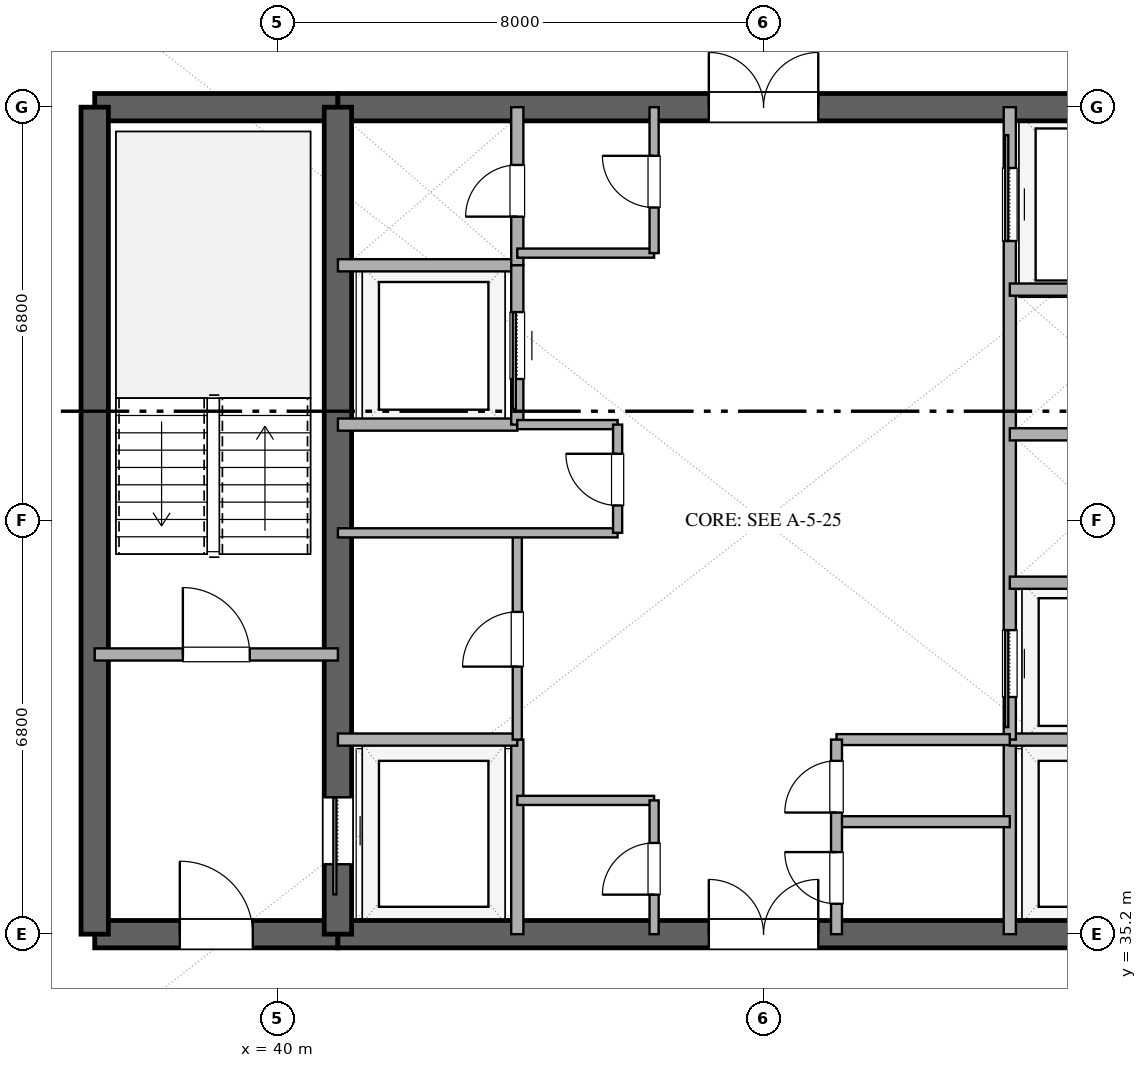
"""IFC4 building model, lengths in metres.
Left out: names, types, materials, properties, quantities, classifications, styles, units other than length and angle.
Written with IfcOpenShell. Run it as: python <this file> out.ifc"""

import sys

from ifc_helpers import new_model, si_unit, direction, frame, frame_2d, origin, place, context, subcontext, project, spatial, rectangle, extrude, element, fill, save


model = new_model("IFC4")
c1 = context("Model", 3, precision=1e-05, world=origin(), true_north=direction((0.0, 1.0)))
c2 = subcontext(c1, "Body", "Model", "MODEL_VIEW")
j1 = project(units=[si_unit("LENGTHUNIT", "METRE"), si_unit("PLANEANGLEUNIT", "RADIAN")], contexts=[c1])
p1 = place(None, origin())
s1 = spatial("IfcSite", under=j1, at=p1, CompositionType="ELEMENT")
p2 = place(p1, origin())
s2 = spatial("IfcBuilding", under=s1, at=p2, CompositionType="ELEMENT")
p3 = place(p2, frame((0.0, 0.0, 150.6)))
s3 = spatial("IfcBuildingStorey", under=s2, at=p3, CompositionType="ELEMENT", Elevation=150.6)
p4 = place(p3, frame((37.0, 35.2, 0.0), z_axis=(0.0, 0.0, 1.0), x_axis=(1.0, 0.0, 0.0)))
e1 = element("IfcWall", 1, at=p4, inside=s3, PredefinedType="SHEAR", context=c2, shape_type="SweptSolid", body=[
    extrude(rectangle(XDim=4.0, YDim=0.45, at=frame_2d((2.0, 0.0))), origin(), (0.0, 0.0, 1.0), 3.38),
])
p5 = place(p4, frame((1.4, 0.0, 0.0)))
e2 = element("IfcOpeningElement", 2, at=p5, cuts=e1, PredefinedType="OPENING", context=c2, shape_type="SweptSolid", body=[
    extrude(rectangle(XDim=1.2, YDim=2.15, at=frame_2d((0.6, 1.075))), frame((0.0, 0.235, 0.0), z_axis=(0.0, -1.0, 0.0), x_axis=(1.0, 0.0, 0.0)), (0.0, 0.0, 1.0), 0.47),
])
p6 = place(p3, frame((41.0, 35.2, 0.0), z_axis=(0.0, 0.0, 1.0), x_axis=(1.0, 0.0, 0.0)))
e3 = element("IfcWall", 3, at=p6, inside=s3, PredefinedType="SHEAR", context=c2, shape_type="SweptSolid", body=[
    extrude(rectangle(XDim=14.0, YDim=0.45, at=frame_2d((7.0, 0.0))), origin(), (0.0, 0.0, 1.0), 3.38),
])
p7 = place(p6, frame((6.1, 0.0, 0.0)))
e4 = element("IfcOpeningElement", 4, at=p7, cuts=e3, PredefinedType="OPENING", context=c2, shape_type="SweptSolid", body=[
    extrude(rectangle(XDim=1.8, YDim=2.25, at=frame_2d((0.9, 1.125))), frame((0.0, 0.235, 0.0), z_axis=(0.0, -1.0, 0.0), x_axis=(1.0, 0.0, 0.0)), (0.0, 0.0, 1.0), 0.47),
])
p8 = place(p3, frame((37.0, 48.8, 0.0), z_axis=(0.0, 0.0, 1.0), x_axis=(1.0, 0.0, 0.0)))
e5 = element("IfcWall", 5, at=p8, inside=s3, PredefinedType="SHEAR", context=c2, shape_type="SweptSolid", body=[
    extrude(rectangle(XDim=4.0, YDim=0.45, at=frame_2d((2.0, 0.0))), origin(), (0.0, 0.0, 1.0), 3.38),
])
p9 = place(p3, frame((41.0, 48.8, 0.0), z_axis=(0.0, 0.0, 1.0), x_axis=(1.0, 0.0, 0.0)))
e6 = element("IfcWall", 6, at=p9, inside=s3, PredefinedType="SHEAR", context=c2, shape_type="SweptSolid", body=[
    extrude(rectangle(XDim=14.0, YDim=0.45, at=frame_2d((7.0, 0.0))), origin(), (0.0, 0.0, 1.0), 3.38),
])
p10 = place(p9, frame((6.1, 0.0, 0.0)))
e7 = element("IfcOpeningElement", 7, at=p10, cuts=e6, PredefinedType="OPENING", context=c2, shape_type="SweptSolid", body=[
    extrude(rectangle(XDim=1.8, YDim=2.25, at=frame_2d((0.9, 1.125))), frame((0.0, 0.235, 0.0), z_axis=(0.0, -1.0, 0.0), x_axis=(1.0, 0.0, 0.0)), (0.0, 0.0, 1.0), 0.47),
])
p11 = place(p3, frame((37.0, 35.2, 0.0), z_axis=(0.0, 0.0, 1.0), x_axis=(0.0, 1.0, 0.0)))
e8 = element("IfcWall", 8, at=p11, inside=s3, PredefinedType="SHEAR", context=c2, shape_type="SweptSolid", body=[
    extrude(rectangle(XDim=13.6, YDim=0.45, at=frame_2d((6.8, 0.0))), origin(), (0.0, 0.0, 1.0), 3.38),
])
p12 = place(p3, frame((41.0, 35.2, 0.0), z_axis=(0.0, 0.0, 1.0), x_axis=(0.0, 1.0, 0.0)))
e9 = element("IfcWall", 9, at=p12, inside=s3, PredefinedType="SHEAR", context=c2, shape_type="SweptSolid", body=[
    extrude(rectangle(XDim=13.6, YDim=0.45, at=frame_2d((6.8, 0.0))), origin(), (0.0, 0.0, 1.0), 3.38),
])
p13 = place(p12, frame((1.15, 0.0, 0.0)))
e10 = element("IfcOpeningElement", 10, at=p13, cuts=e9, PredefinedType="OPENING", context=c2, shape_type="SweptSolid", body=[
    extrude(rectangle(XDim=1.1, YDim=2.2, at=frame_2d((0.55, 1.1))), frame((0.0, 0.235, 0.0), z_axis=(0.0, -1.0, 0.0), x_axis=(1.0, 0.0, 0.0)), (0.0, 0.0, 1.0), 0.47),
])
p14 = place(p3, frame((37.0, 39.8, 0.0), z_axis=(0.0, 0.0, 1.0), x_axis=(1.0, 0.0, 0.0)))
e11 = element("IfcWall", 11, at=p14, inside=s3, PredefinedType="SOLIDWALL", context=c2, shape_type="SweptSolid", body=[
    extrude(rectangle(XDim=4.0, YDim=0.2, at=frame_2d((2.0, 0.0))), origin(), (0.0, 0.0, 1.0), 2.74),
])
p15 = place(p14, frame((1.45, 0.0, 0.0)))
e12 = element("IfcOpeningElement", 12, at=p15, cuts=e11, PredefinedType="OPENING", context=c2, shape_type="SweptSolid", body=[
    extrude(rectangle(XDim=1.1, YDim=2.15, at=frame_2d((0.55, 1.075))), frame((0.0, 0.11, 0.0), z_axis=(0.0, -1.0, 0.0), x_axis=(1.0, 0.0, 0.0)), (0.0, 0.0, 1.0), 0.22),
])
p16 = place(p3, frame((43.95, 35.2, 0.0), z_axis=(0.0, 0.0, 1.0), x_axis=(0.0, 1.0, 0.0)))
e13 = element("IfcWall", 13, at=p16, inside=s3, PredefinedType="SOLIDWALL", context=c2, shape_type="SweptSolid", body=[
    extrude(rectangle(XDim=3.2, YDim=0.2, at=frame_2d((1.6, 0.0))), origin(), (0.0, 0.0, 1.0), 2.74),
])
p17 = place(p3, frame((41.0, 38.4, 0.0), z_axis=(0.0, 0.0, 1.0), x_axis=(1.0, 0.0, 0.0)))
e14 = element("IfcWall", 14, at=p17, inside=s3, PredefinedType="SOLIDWALL", context=c2, shape_type="SweptSolid", body=[
    extrude(rectangle(XDim=2.95, YDim=0.2, at=frame_2d((1.475, 0.0))), origin(), (0.0, 0.0, 1.0), 2.74),
])
p18 = place(p3, frame((52.05, 35.2, 0.0), z_axis=(0.0, 0.0, 1.0), x_axis=(0.0, 1.0, 0.0)))
e15 = element("IfcWall", 15, at=p18, inside=s3, PredefinedType="SOLIDWALL", context=c2, shape_type="SweptSolid", body=[
    extrude(rectangle(XDim=3.2, YDim=0.2, at=frame_2d((1.6, 0.0))), origin(), (0.0, 0.0, 1.0), 2.74),
])
for number, where, z_axis, x_axis in (
    (16, (52.05, 38.4, 0.0), (0.0, 0.0, 1.0), (1.0, 0.0, 0.0)),
    (17, (41.0, 46.2, 0.0), (0.0, 0.0, 1.0), (1.0, 0.0, 0.0)),
):
    element("IfcWall", number, at=place(p3, frame(where, z_axis=z_axis, x_axis=x_axis)), inside=s3, PredefinedType="SOLIDWALL", context=c2, shape_type="SweptSolid", body=[
        extrude(rectangle(XDim=2.95, YDim=0.2, at=frame_2d((1.475, 0.0))), origin(), (0.0, 0.0, 1.0), 2.74),
    ])
p19 = place(p3, frame((43.95, 46.2, 0.0), z_axis=(0.0, 0.0, 1.0), x_axis=(0.0, 1.0, 0.0)))
e18 = element("IfcWall", 18, at=p19, inside=s3, PredefinedType="SOLIDWALL", context=c2, shape_type="SweptSolid", body=[
    extrude(rectangle(XDim=2.6, YDim=0.2, at=frame_2d((1.3, 0.0))), origin(), (0.0, 0.0, 1.0), 2.74),
])
p20 = place(p19, frame((0.8, 0.0, 0.0)))
e19 = element("IfcOpeningElement", 19, at=p20, cuts=e18, PredefinedType="OPENING", context=c2, shape_type="SweptSolid", body=[
    extrude(rectangle(XDim=0.85, YDim=2.15, at=frame_2d((0.425, 1.075))), frame((0.0, 0.11, 0.0), z_axis=(0.0, -1.0, 0.0), x_axis=(1.0, 0.0, 0.0)), (0.0, 0.0, 1.0), 0.22),
])
p21 = place(p3, frame((41.0, 43.58, 0.0), z_axis=(0.0, 0.0, 1.0), x_axis=(1.0, 0.0, 0.0)))
e20 = element("IfcWall", 20, at=p21, inside=s3, PredefinedType="SOLIDWALL", context=c2, shape_type="SweptSolid", body=[
    extrude(rectangle(XDim=2.95, YDim=0.2, at=frame_2d((1.475, 0.0))), origin(), (0.0, 0.0, 1.0), 2.74),
])
p22 = place(p3, frame((43.95, 43.58, 0.0), z_axis=(0.0, 0.0, 1.0), x_axis=(0.0, 1.0, 0.0)))
e21 = element("IfcWall", 21, at=p22, inside=s3, PredefinedType="SOLIDWALL", context=c2, shape_type="SweptSolid", body=[
    extrude(rectangle(XDim=2.62, YDim=0.2, at=frame_2d((1.31, 0.0))), origin(), (0.0, 0.0, 1.0), 2.74),
])
p23 = place(p22, frame((0.75, 0.0, 0.0)))
e22 = element("IfcOpeningElement", 22, at=p23, cuts=e21, PredefinedType="OPENING", context=c2, shape_type="SweptSolid", body=[
    extrude(rectangle(XDim=1.1, YDim=2.2, at=frame_2d((0.55, 1.1))), frame((0.0, 0.11, 0.0), z_axis=(0.0, -1.0, 0.0), x_axis=(1.0, 0.0, 0.0)), (0.0, 0.0, 1.0), 0.22),
])
p24 = place(p3, frame((43.95, 38.4, 0.0), z_axis=(0.0, 0.0, 1.0), x_axis=(0.0, 1.0, 0.0)))
e23 = element("IfcWall", 23, at=p24, inside=s3, PredefinedType="PARTITIONING", context=c2, shape_type="SweptSolid", body=[
    extrude(rectangle(XDim=3.4, YDim=0.15, at=frame_2d((1.7, 0.0))), origin(), (0.0, 0.0, 1.0), 2.74),
])
p25 = place(p24, frame((1.2, 0.0, 0.0)))
e24 = element("IfcOpeningElement", 24, at=p25, cuts=e23, PredefinedType="OPENING", context=c2, shape_type="SweptSolid", body=[
    extrude(rectangle(XDim=0.9, YDim=2.15, at=frame_2d((0.45, 1.075))), frame((0.0, 0.085, 0.0), z_axis=(0.0, -1.0, 0.0), x_axis=(1.0, 0.0, 0.0)), (0.0, 0.0, 1.0), 0.17),
])
p26 = place(p3, frame((41.0, 41.8, 0.0), z_axis=(0.0, 0.0, 1.0), x_axis=(1.0, 0.0, 0.0)))
e25 = element("IfcWall", 25, at=p26, inside=s3, PredefinedType="PARTITIONING", context=c2, shape_type="SweptSolid", body=[
    extrude(rectangle(XDim=4.6, YDim=0.15, at=frame_2d((2.3, 0.0))), origin(), (0.0, 0.0, 1.0), 2.74),
])
p27 = place(p3, frame((43.95, 43.58, 0.0), z_axis=(0.0, 0.0, 1.0), x_axis=(1.0, 0.0, 0.0)))
e26 = element("IfcWall", 26, at=p27, inside=s3, PredefinedType="PARTITIONING", context=c2, shape_type="SweptSolid", body=[
    extrude(rectangle(XDim=1.65, YDim=0.15, at=frame_2d((0.825, 0.0))), origin(), (0.0, 0.0, 1.0), 2.74),
])
p28 = place(p3, frame((45.6, 41.8, 0.0), z_axis=(0.0, 0.0, 1.0), x_axis=(0.0, 1.0, 0.0)))
e27 = element("IfcWall", 27, at=p28, inside=s3, PredefinedType="PARTITIONING", context=c2, shape_type="SweptSolid", body=[
    extrude(rectangle(XDim=1.78, YDim=0.15, at=frame_2d((0.89, 0.0))), origin(), (0.0, 0.0, 1.0), 2.74),
])
p29 = place(p28, frame((0.45, 0.0, 0.0)))
e28 = element("IfcOpeningElement", 28, at=p29, cuts=e27, PredefinedType="OPENING", context=c2, shape_type="SweptSolid", body=[
    extrude(rectangle(XDim=0.85, YDim=2.15, at=frame_2d((0.425, 1.075))), frame((0.0, 0.085, 0.0), z_axis=(0.0, -1.0, 0.0), x_axis=(1.0, 0.0, 0.0)), (0.0, 0.0, 1.0), 0.17),
])
p30 = place(p3, frame((52.05, 38.4, 0.0), z_axis=(0.0, 0.0, 1.0), x_axis=(0.0, 1.0, 0.0)))
e29 = element("IfcWall", 29, at=p30, inside=s3, PredefinedType="SOLIDWALL", context=c2, shape_type="SweptSolid", body=[
    extrude(rectangle(XDim=10.4, YDim=0.2, at=frame_2d((5.2, 0.0))), origin(), (0.0, 0.0, 1.0), 2.74),
])
p31 = place(p30, frame((0.7, 0.0, 0.0)))
e30 = element("IfcOpeningElement", 30, at=p31, cuts=e29, PredefinedType="OPENING", context=c2, shape_type="SweptSolid", body=[
    extrude(rectangle(XDim=1.1, YDim=2.2, at=frame_2d((0.55, 1.1))), frame((0.0, 0.11, 0.0), z_axis=(0.0, -1.0, 0.0), x_axis=(1.0, 0.0, 0.0)), (0.0, 0.0, 1.0), 0.22),
])
p32 = place(p30, frame((8.2, 0.0, 0.0)))
e31 = element("IfcOpeningElement", 31, at=p32, cuts=e29, PredefinedType="OPENING", context=c2, shape_type="SweptSolid", body=[
    extrude(rectangle(XDim=1.2, YDim=2.2, at=frame_2d((0.6, 1.1))), frame((0.0, 0.11, 0.0), z_axis=(0.0, -1.0, 0.0), x_axis=(1.0, 0.0, 0.0)), (0.0, 0.0, 1.0), 0.22),
])
for number, where, z_axis, x_axis in (
    (32, (52.05, 40.98, 0.0), (0.0, 0.0, 1.0), (1.0, 0.0, 0.0)),
    (33, (52.05, 43.42, 0.0), (0.0, 0.0, 1.0), (1.0, 0.0, 0.0)),
    (34, (52.05, 45.8, 0.0), (0.0, 0.0, 1.0), (1.0, 0.0, 0.0)),
):
    element("IfcWall", number, at=place(p3, frame(where, z_axis=z_axis, x_axis=x_axis)), inside=s3, PredefinedType="SOLIDWALL", context=c2, shape_type="SweptSolid", body=[
        extrude(rectangle(XDim=2.95, YDim=0.2, at=frame_2d((1.475, 0.0))), origin(), (0.0, 0.0, 1.0), 2.74),
    ])
p33 = place(p3, frame((43.95, 37.4, 0.0), z_axis=(0.0, 0.0, 1.0), x_axis=(1.0, 0.0, 0.0)))
e35 = element("IfcWall", 35, at=p33, inside=s3, PredefinedType="PARTITIONING", context=c2, shape_type="SweptSolid", body=[
    extrude(rectangle(XDim=2.25, YDim=0.15, at=frame_2d((1.125, 0.0))), origin(), (0.0, 0.0, 1.0), 2.74),
])
p34 = place(p3, frame((46.2, 35.2, 0.0), z_axis=(0.0, 0.0, 1.0), x_axis=(0.0, 1.0, 0.0)))
e36 = element("IfcWall", 36, at=p34, inside=s3, PredefinedType="PARTITIONING", context=c2, shape_type="SweptSolid", body=[
    extrude(rectangle(XDim=2.2, YDim=0.15, at=frame_2d((1.1, 0.0))), origin(), (0.0, 0.0, 1.0), 2.74),
])
p35 = place(p34, frame((0.65, 0.0, 0.0)))
e37 = element("IfcOpeningElement", 37, at=p35, cuts=e36, PredefinedType="OPENING", context=c2, shape_type="SweptSolid", body=[
    extrude(rectangle(XDim=0.85, YDim=2.15, at=frame_2d((0.425, 1.075))), frame((0.0, 0.085, 0.0), z_axis=(0.0, -1.0, 0.0), x_axis=(1.0, 0.0, 0.0)), (0.0, 0.0, 1.0), 0.17),
])
p36 = place(p3, frame((43.95, 46.4, 0.0), z_axis=(0.0, 0.0, 1.0), x_axis=(1.0, 0.0, 0.0)))
e38 = element("IfcWall", 38, at=p36, inside=s3, PredefinedType="PARTITIONING", context=c2, shape_type="SweptSolid", body=[
    extrude(rectangle(XDim=2.25, YDim=0.15, at=frame_2d((1.125, 0.0))), origin(), (0.0, 0.0, 1.0), 2.74),
])
p37 = place(p3, frame((46.2, 46.4, 0.0), z_axis=(0.0, 0.0, 1.0), x_axis=(0.0, 1.0, 0.0)))
e39 = element("IfcWall", 39, at=p37, inside=s3, PredefinedType="PARTITIONING", context=c2, shape_type="SweptSolid", body=[
    extrude(rectangle(XDim=2.4, YDim=0.15, at=frame_2d((1.2, 0.0))), origin(), (0.0, 0.0, 1.0), 2.74),
])
p38 = place(p37, frame((0.75, 0.0, 0.0)))
e40 = element("IfcOpeningElement", 40, at=p38, cuts=e39, PredefinedType="OPENING", context=c2, shape_type="SweptSolid", body=[
    extrude(rectangle(XDim=0.85, YDim=2.15, at=frame_2d((0.425, 1.075))), frame((0.0, 0.085, 0.0), z_axis=(0.0, -1.0, 0.0), x_axis=(1.0, 0.0, 0.0)), (0.0, 0.0, 1.0), 0.17),
])
for number, where, z_axis, x_axis in (
    (41, (49.2, 37.05, 0.0), (0.0, 0.0, 1.0), (1.0, 0.0, 0.0)),
    (42, (49.2, 38.4, 0.0), (0.0, 0.0, 1.0), (1.0, 0.0, 0.0)),
):
    element("IfcWall", number, at=place(p3, frame(where, z_axis=z_axis, x_axis=x_axis)), inside=s3, PredefinedType="PLUMBINGWALL", context=c2, shape_type="SweptSolid", body=[
        extrude(rectangle(XDim=2.85, YDim=0.18, at=frame_2d((1.425, 0.0))), origin(), (0.0, 0.0, 1.0), 2.74),
    ])
p39 = place(p3, frame((49.2, 35.2, 0.0), z_axis=(0.0, 0.0, 1.0), x_axis=(0.0, 1.0, 0.0)))
e43 = element("IfcWall", 43, at=p39, inside=s3, PredefinedType="PLUMBINGWALL", context=c2, shape_type="SweptSolid", body=[
    extrude(rectangle(XDim=3.2, YDim=0.18, at=frame_2d((1.6, 0.0))), origin(), (0.0, 0.0, 1.0), 2.74),
])
p40 = place(p39, frame((0.5, 0.0, 0.0)))
e44 = element("IfcOpeningElement", 44, at=p40, cuts=e43, PredefinedType="OPENING", context=c2, shape_type="SweptSolid", body=[
    extrude(rectangle(XDim=0.85, YDim=2.1, at=frame_2d((0.425, 1.05))), frame((0.0, 0.1, 0.0), z_axis=(0.0, -1.0, 0.0), x_axis=(1.0, 0.0, 0.0)), (0.0, 0.0, 1.0), 0.2),
])
p41 = place(p39, frame((2.0, 0.0, 0.0)))
e45 = element("IfcOpeningElement", 45, at=p41, cuts=e43, PredefinedType="OPENING", context=c2, shape_type="SweptSolid", body=[
    extrude(rectangle(XDim=0.85, YDim=2.15, at=frame_2d((0.425, 1.075))), frame((0.0, 0.1, 0.0), z_axis=(0.0, -1.0, 0.0), x_axis=(1.0, 0.0, 0.0)), (0.0, 0.0, 1.0), 0.2),
])
p42 = place(p13, origin())
e46 = element("IfcDoor", 46, at=p42, inside=s3, OperationType="SLIDING_TO_LEFT", PredefinedType="DOOR", context=c2, shape_type="SweptSolid", body=[
    extrude(rectangle(XDim=1.1, YDim=2.2, at=frame_2d((0.55, 1.1))), frame((0.0, 0.025, 0.0), z_axis=(0.0, -1.0, 0.0), x_axis=(1.0, 0.0, 0.0)), (0.0, 0.0, 1.0), 0.05),
])
fill(e10, e46)
p43 = place(p5, origin())
e47 = element("IfcDoor", 47, at=p43, inside=s3, OperationType="SINGLE_SWING_LEFT", PredefinedType="DOOR", context=c2, shape_type="SweptSolid", body=[
    extrude(rectangle(XDim=1.2, YDim=2.15, at=frame_2d((0.6, 1.075))), frame((0.0, 0.025, 0.0), z_axis=(0.0, -1.0, 0.0), x_axis=(1.0, 0.0, 0.0)), (0.0, 0.0, 1.0), 0.05),
])
fill(e2, e47)
p44 = place(p7, origin())
e48 = element("IfcDoor", 48, at=p44, inside=s3, OperationType="DOUBLE_DOOR_SINGLE_SWING", PredefinedType="DOOR", context=c2, shape_type="SweptSolid", body=[
    extrude(rectangle(XDim=1.8, YDim=2.25, at=frame_2d((0.9, 1.125))), frame((0.0, 0.025, 0.0), z_axis=(0.0, -1.0, 0.0), x_axis=(1.0, 0.0, 0.0)), (0.0, 0.0, 1.0), 0.05),
])
fill(e4, e48)
p45 = place(p10, origin())
e49 = element("IfcDoor", 49, at=p45, inside=s3, OperationType="DOUBLE_DOOR_SINGLE_SWING", PredefinedType="DOOR", context=c2, shape_type="SweptSolid", body=[
    extrude(rectangle(XDim=1.8, YDim=2.25, at=frame_2d((0.9, 1.125))), frame((0.0, 0.025, 0.0), z_axis=(0.0, -1.0, 0.0), x_axis=(1.0, 0.0, 0.0)), (0.0, 0.0, 1.0), 0.05),
])
fill(e7, e49)
p46 = place(p15, origin())
e50 = element("IfcDoor", 50, at=p46, inside=s3, OperationType="SINGLE_SWING_LEFT", PredefinedType="DOOR", context=c2, shape_type="SweptSolid", body=[
    extrude(rectangle(XDim=1.1, YDim=2.15, at=frame_2d((0.55, 1.075))), frame((0.0, 0.025, 0.0), z_axis=(0.0, -1.0, 0.0), x_axis=(1.0, 0.0, 0.0)), (0.0, 0.0, 1.0), 0.05),
])
fill(e12, e50)
p47 = place(p20, origin())
e51 = element("IfcDoor", 51, at=p47, inside=s3, OperationType="SINGLE_SWING_LEFT", PredefinedType="DOOR", context=c2, shape_type="SweptSolid", body=[
    extrude(rectangle(XDim=0.85, YDim=2.15, at=frame_2d((0.425, 1.075))), frame((0.0, 0.025, 0.0), z_axis=(0.0, -1.0, 0.0), x_axis=(1.0, 0.0, 0.0)), (0.0, 0.0, 1.0), 0.05),
])
fill(e19, e51)
p48 = place(p23, origin())
e52 = element("IfcDoor", 52, at=p48, inside=s3, OperationType="SLIDING_TO_LEFT", PredefinedType="DOOR", context=c2, shape_type="SweptSolid", body=[
    extrude(rectangle(XDim=1.1, YDim=2.2, at=frame_2d((0.55, 1.1))), frame((0.0, 0.025, 0.0), z_axis=(0.0, -1.0, 0.0), x_axis=(1.0, 0.0, 0.0)), (0.0, 0.0, 1.0), 0.05),
])
fill(e22, e52)
p49 = place(p25, origin())
e53 = element("IfcDoor", 53, at=p49, inside=s3, OperationType="SINGLE_SWING_LEFT", PredefinedType="DOOR", context=c2, shape_type="SweptSolid", body=[
    extrude(rectangle(XDim=0.9, YDim=2.15, at=frame_2d((0.45, 1.075))), frame((0.0, 0.025, 0.0), z_axis=(0.0, -1.0, 0.0), x_axis=(1.0, 0.0, 0.0)), (0.0, 0.0, 1.0), 0.05),
])
fill(e24, e53)
p50 = place(p29, origin())
e54 = element("IfcDoor", 54, at=p50, inside=s3, OperationType="SINGLE_SWING_RIGHT", PredefinedType="DOOR", context=c2, shape_type="SweptSolid", body=[
    extrude(rectangle(XDim=0.85, YDim=2.15, at=frame_2d((0.425, 1.075))), frame((0.0, 0.025, 0.0), z_axis=(0.0, -1.0, 0.0), x_axis=(1.0, 0.0, 0.0)), (0.0, 0.0, 1.0), 0.05),
])
fill(e28, e54)
p51 = place(p31, origin())
e55 = element("IfcDoor", 55, at=p51, inside=s3, OperationType="SLIDING_TO_LEFT", PredefinedType="DOOR", context=c2, shape_type="SweptSolid", body=[
    extrude(rectangle(XDim=1.1, YDim=2.2, at=frame_2d((0.55, 1.1))), frame((0.0, 0.025, 0.0), z_axis=(0.0, -1.0, 0.0), x_axis=(1.0, 0.0, 0.0)), (0.0, 0.0, 1.0), 0.05),
])
fill(e30, e55)
p52 = place(p32, origin())
e56 = element("IfcDoor", 56, at=p52, inside=s3, OperationType="SLIDING_TO_RIGHT", PredefinedType="DOOR", context=c2, shape_type="SweptSolid", body=[
    extrude(rectangle(XDim=1.2, YDim=2.2, at=frame_2d((0.6, 1.1))), frame((0.0, 0.025, 0.0), z_axis=(0.0, -1.0, 0.0), x_axis=(1.0, 0.0, 0.0)), (0.0, 0.0, 1.0), 0.05),
])
fill(e31, e56)
p53 = place(p35, origin())
e57 = element("IfcDoor", 57, at=p53, inside=s3, OperationType="SINGLE_SWING_LEFT", PredefinedType="DOOR", context=c2, shape_type="SweptSolid", body=[
    extrude(rectangle(XDim=0.85, YDim=2.15, at=frame_2d((0.425, 1.075))), frame((0.0, 0.025, 0.0), z_axis=(0.0, -1.0, 0.0), x_axis=(1.0, 0.0, 0.0)), (0.0, 0.0, 1.0), 0.05),
])
fill(e37, e57)
p54 = place(p38, origin())
e58 = element("IfcDoor", 58, at=p54, inside=s3, OperationType="SINGLE_SWING_RIGHT", PredefinedType="DOOR", context=c2, shape_type="SweptSolid", body=[
    extrude(rectangle(XDim=0.85, YDim=2.15, at=frame_2d((0.425, 1.075))), frame((0.0, 0.025, 0.0), z_axis=(0.0, -1.0, 0.0), x_axis=(1.0, 0.0, 0.0)), (0.0, 0.0, 1.0), 0.05),
])
fill(e40, e58)
p55 = place(p40, origin())
e59 = element("IfcDoor", 59, at=p55, inside=s3, OperationType="SINGLE_SWING_RIGHT", PredefinedType="DOOR", context=c2, shape_type="SweptSolid", body=[
    extrude(rectangle(XDim=0.85, YDim=2.1, at=frame_2d((0.425, 1.05))), frame((0.0, 0.025, 0.0), z_axis=(0.0, -1.0, 0.0), x_axis=(1.0, 0.0, 0.0)), (0.0, 0.0, 1.0), 0.05),
])
fill(e44, e59)
p56 = place(p41, origin())
e60 = element("IfcDoor", 60, at=p56, inside=s3, OperationType="SINGLE_SWING_LEFT", PredefinedType="DOOR", context=c2, shape_type="SweptSolid", body=[
    extrude(rectangle(XDim=0.85, YDim=2.15, at=frame_2d((0.425, 1.075))), frame((0.0, 0.025, 0.0), z_axis=(0.0, -1.0, 0.0), x_axis=(1.0, 0.0, 0.0)), (0.0, 0.0, 1.0), 0.05),
])
fill(e45, e60)
save(model, sys.argv[1])
